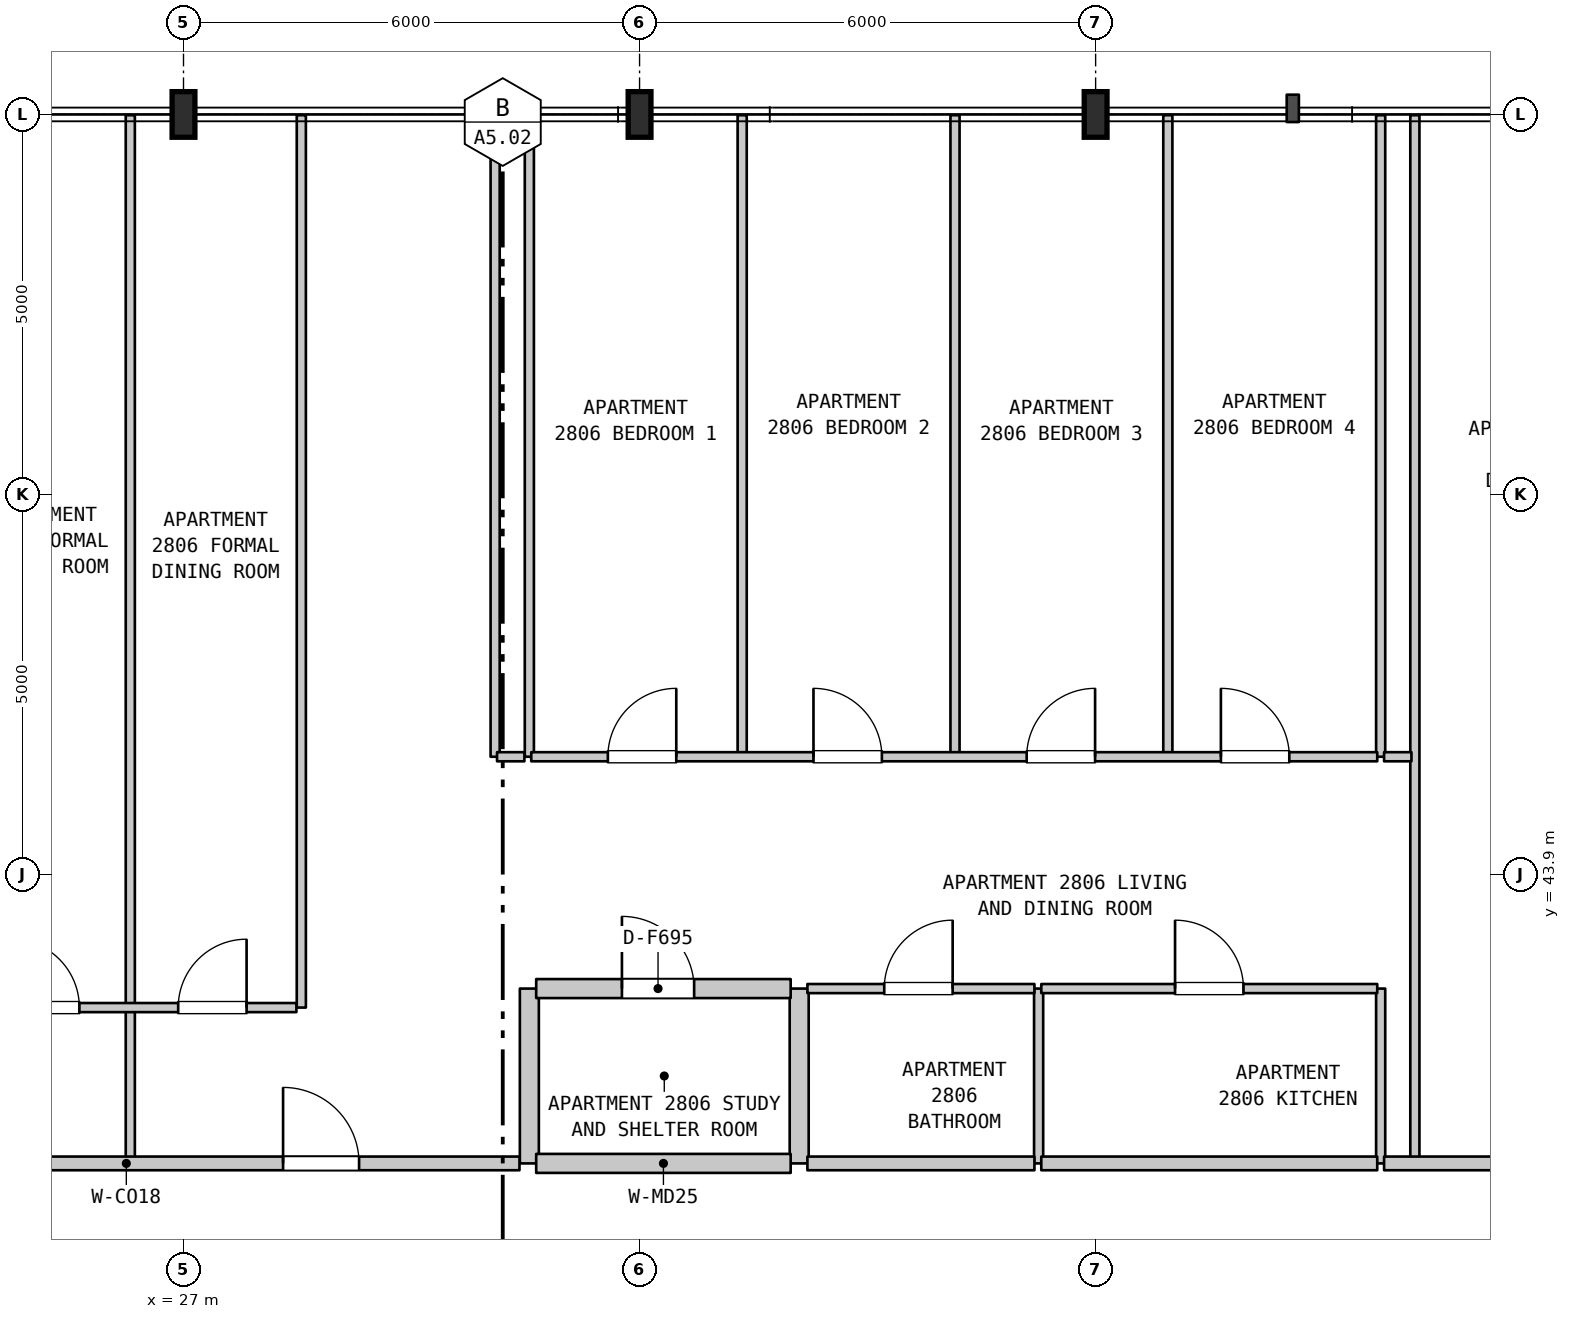
"""IFC4 building model, lengths in metres.
Left out: names, types, materials, properties, quantities, classifications, styles, units other than length and angle.
Written with IfcOpenShell. Run it as: python <this file> out.ifc"""

import sys

from ifc_helpers import new_model, si_unit, direction, frame, frame_2d, origin, origin_2d, place, context, subcontext, project, spatial, rectangle, i_section, extrude, element, fill, save


model = new_model("IFC4")
c1 = context("Model", 3, precision=1e-05, world=origin(), true_north=direction((0.0, 1.0)))
c2 = subcontext(c1, "Body", "Model", "MODEL_VIEW")
j1 = project(units=[si_unit("LENGTHUNIT", "METRE"), si_unit("PLANEANGLEUNIT", "RADIAN")], contexts=[c1])
p1 = place(None, origin())
s1 = spatial("IfcSite", under=j1, at=p1, CompositionType="ELEMENT")
p2 = place(p1, origin())
s2 = spatial("IfcBuilding", under=s1, at=p2, CompositionType="ELEMENT")
p3 = place(p2, frame((0.0, 0.0, 116.8)))
s3 = spatial("IfcBuildingStorey", under=s2, at=p3, CompositionType="ELEMENT", Elevation=116.8)
for number, where, z_axis, x_axis in (
    (1, (27.0, 53.9, 0.0), (0.0, 0.0, 1.0), (1.0, 0.0, 0.0)),
    (2, (33.0, 53.9, 0.0), (0.0, 0.0, 1.0), (1.0, 0.0, 0.0)),
    (3, (39.0, 53.9, 0.0), (0.0, 0.0, 1.0), (1.0, 0.0, 0.0)),
):
    element("IfcColumn", number, at=place(p3, frame(where, z_axis=z_axis, x_axis=x_axis)), inside=s3, PredefinedType="COLUMN", context=c2, shape_type="SweptSolid", body=[
        extrude(i_section(OverallWidth=0.3, OverallDepth=0.6, WebThickness=0.015, FlangeThickness=0.03, FilletRadius=0.027, at=origin_2d()), origin(), (0.0, 0.0, 1.0), 3.7),
    ])
p4 = place(p3, frame((26.3, 40.1, 0.0), z_axis=(0.0, 0.0, 1.0), x_axis=(0.0, 1.0, 0.0)))
e4 = element("IfcWall", 4, at=p4, inside=s3, PredefinedType="PARTITIONING", context=c2, shape_type="SweptSolid", body=[
    extrude(rectangle(XDim=2.05, YDim=0.12, at=frame_2d((1.025, 0.0))), origin(), (0.0, 0.0, 1.0), 3.38),
])
for number, where, z_axis, x_axis in (
    (5, (26.3, 42.15, 0.0), (0.0, 0.0, 1.0), (0.0, 1.0, 0.0)),
    (6, (28.55, 42.15, 0.0), (0.0, 0.0, 1.0), (0.0, 1.0, 0.0)),
):
    element("IfcWall", number, at=place(p3, frame(where, z_axis=z_axis, x_axis=x_axis)), inside=s3, PredefinedType="PARTITIONING", context=c2, shape_type="SweptSolid", body=[
        extrude(rectangle(XDim=11.74, YDim=0.12, at=frame_2d((5.87, 0.0))), origin(), (0.0, 0.0, 1.0), 3.38),
    ])
p5 = place(p3, frame((31.1, 45.45, 0.0), z_axis=(0.0, 0.0, 1.0), x_axis=(0.0, 1.0, 0.0)))
e7 = element("IfcWall", 7, at=p5, inside=s3, PredefinedType="PARTITIONING", context=c2, shape_type="SweptSolid", body=[
    extrude(rectangle(XDim=8.44, YDim=0.12, at=frame_2d((4.22, 0.0))), origin(), (0.0, 0.0, 1.0), 3.38),
])
p6 = place(p3, frame((31.55, 40.1, 0.0), z_axis=(0.0, 0.0, 1.0), x_axis=(0.0, 1.0, 0.0)))
e8 = element("IfcWall", 8, at=p6, inside=s3, PredefinedType="STANDARD", context=c2, shape_type="SweptSolid", body=[
    extrude(rectangle(XDim=2.3, YDim=0.25, at=frame_2d((1.15, 0.0))), origin(), (0.0, 0.0, 1.0), 3.38),
])
for number, where, z_axis, x_axis in (
    (9, (31.55, 45.45, 0.0), (0.0, 0.0, 1.0), (0.0, 1.0, 0.0)),
    (10, (34.35, 45.45, 0.0), (0.0, 0.0, 1.0), (0.0, 1.0, 0.0)),
):
    element("IfcWall", number, at=place(p3, frame(where, z_axis=z_axis, x_axis=x_axis)), inside=s3, PredefinedType="PARTITIONING", context=c2, shape_type="SweptSolid", body=[
        extrude(rectangle(XDim=8.44, YDim=0.12, at=frame_2d((4.22, 0.0))), origin(), (0.0, 0.0, 1.0), 3.38),
    ])
p7 = place(p3, frame((35.1, 40.1, 0.0), z_axis=(0.0, 0.0, 1.0), x_axis=(0.0, 1.0, 0.0)))
e11 = element("IfcWall", 11, at=p7, inside=s3, PredefinedType="STANDARD", context=c2, shape_type="SweptSolid", body=[
    extrude(rectangle(XDim=2.3, YDim=0.25, at=frame_2d((1.15, 0.0))), origin(), (0.0, 0.0, 1.0), 3.38),
])
p8 = place(p3, frame((37.15, 45.45, 0.0), z_axis=(0.0, 0.0, 1.0), x_axis=(0.0, 1.0, 0.0)))
e12 = element("IfcWall", 12, at=p8, inside=s3, PredefinedType="PARTITIONING", context=c2, shape_type="SweptSolid", body=[
    extrude(rectangle(XDim=8.44, YDim=0.12, at=frame_2d((4.22, 0.0))), origin(), (0.0, 0.0, 1.0), 3.38),
])
p9 = place(p3, frame((38.25, 40.1, 0.0), z_axis=(0.0, 0.0, 1.0), x_axis=(0.0, 1.0, 0.0)))
e13 = element("IfcWall", 13, at=p9, inside=s3, PredefinedType="PARTITIONING", context=c2, shape_type="SweptSolid", body=[
    extrude(rectangle(XDim=2.3, YDim=0.12, at=frame_2d((1.15, 0.0))), origin(), (0.0, 0.0, 1.0), 3.38),
])
p10 = place(p3, frame((39.95, 45.45, 0.0), z_axis=(0.0, 0.0, 1.0), x_axis=(0.0, 1.0, 0.0)))
e14 = element("IfcWall", 14, at=p10, inside=s3, PredefinedType="PARTITIONING", context=c2, shape_type="SweptSolid", body=[
    extrude(rectangle(XDim=8.44, YDim=0.12, at=frame_2d((4.22, 0.0))), origin(), (0.0, 0.0, 1.0), 3.38),
])
p11 = place(p3, frame((42.75, 40.1, 0.0), z_axis=(0.0, 0.0, 1.0), x_axis=(0.0, 1.0, 0.0)))
e15 = element("IfcWall", 15, at=p11, inside=s3, PredefinedType="PARTITIONING", context=c2, shape_type="SweptSolid", body=[
    extrude(rectangle(XDim=2.3, YDim=0.12, at=frame_2d((1.15, 0.0))), origin(), (0.0, 0.0, 1.0), 3.38),
])
p12 = place(p3, frame((42.75, 45.45, 0.0), z_axis=(0.0, 0.0, 1.0), x_axis=(0.0, 1.0, 0.0)))
e16 = element("IfcWall", 16, at=p12, inside=s3, PredefinedType="PARTITIONING", context=c2, shape_type="SweptSolid", body=[
    extrude(rectangle(XDim=8.44, YDim=0.12, at=frame_2d((4.22, 0.0))), origin(), (0.0, 0.0, 1.0), 3.38),
])
p13 = place(p3, frame((43.2, 40.1, 0.0), z_axis=(0.0, 0.0, 1.0), x_axis=(0.0, 1.0, 0.0)))
e17 = element("IfcWall", 17, at=p13, inside=s3, PredefinedType="PARTITIONING", context=c2, shape_type="SweptSolid", body=[
    extrude(rectangle(XDim=13.79, YDim=0.12, at=frame_2d((6.895, 0.0))), origin(), (0.0, 0.0, 1.0), 3.38),
])
p14 = place(p3, frame((21.075, 40.1, 0.0), z_axis=(0.0, 0.0, 1.0), x_axis=(1.0, 0.0, 0.0)))
e18 = element("IfcWall", 18, at=p14, inside=s3, PredefinedType="STANDARD", context=c2, shape_type="SweptSolid", body=[
    extrude(rectangle(XDim=10.345, YDim=0.18, at=frame_2d((5.172, 0.0))), origin(), (0.0, 0.0, 1.0), 3.38),
])
p15 = place(p14, frame((2.305, 0.0, 0.0)))
e19 = element("IfcOpeningElement", 19, at=p15, cuts=e18, PredefinedType="OPENING", context=c2, shape_type="SweptSolid", body=[
    extrude(rectangle(XDim=1.0, YDim=2.15, at=frame_2d((0.5, 1.075))), frame((0.0, 0.1, 0.0), z_axis=(0.0, -1.0, 0.0), x_axis=(1.0, 0.0, 0.0)), (0.0, 0.0, 1.0), 0.2),
])
p16 = place(p14, frame((7.235, 0.0, 0.0)))
e20 = element("IfcOpeningElement", 20, at=p16, cuts=e18, PredefinedType="OPENING", context=c2, shape_type="SweptSolid", body=[
    extrude(rectangle(XDim=1.0, YDim=2.15, at=frame_2d((0.5, 1.075))), frame((0.0, 0.1, 0.0), z_axis=(0.0, -1.0, 0.0), x_axis=(1.0, 0.0, 0.0)), (0.0, 0.0, 1.0), 0.2),
])
p17 = place(p3, frame((31.64, 40.1, 0.0), z_axis=(0.0, 0.0, 1.0), x_axis=(1.0, 0.0, 0.0)))
e21 = element("IfcWall", 21, at=p17, inside=s3, PredefinedType="STANDARD", context=c2, shape_type="SweptSolid", body=[
    extrude(rectangle(XDim=3.348, YDim=0.25, at=frame_2d((1.674, 0.0))), origin(), (0.0, 0.0, 1.0), 3.38),
])
p18 = place(p3, frame((35.208, 40.1, 0.0), z_axis=(0.0, 0.0, 1.0), x_axis=(1.0, 0.0, 0.0)))
e22 = element("IfcWall", 22, at=p18, inside=s3, PredefinedType="STANDARD", context=c2, shape_type="SweptSolid", body=[
    extrude(rectangle(XDim=2.987, YDim=0.18, at=frame_2d((1.494, 0.0))), origin(), (0.0, 0.0, 1.0), 3.38),
])
p19 = place(p3, frame((38.285, 40.1, 0.0), z_axis=(0.0, 0.0, 1.0), x_axis=(1.0, 0.0, 0.0)))
e23 = element("IfcWall", 23, at=p19, inside=s3, PredefinedType="STANDARD", context=c2, shape_type="SweptSolid", body=[
    extrude(rectangle(XDim=4.42, YDim=0.18, at=frame_2d((2.21, 0.0))), origin(), (0.0, 0.0, 1.0), 3.38),
])
p20 = place(p3, frame((42.795, 40.1, 0.0), z_axis=(0.0, 0.0, 1.0), x_axis=(1.0, 0.0, 0.0)))
e24 = element("IfcWall", 24, at=p20, inside=s3, PredefinedType="STANDARD", context=c2, shape_type="SweptSolid", body=[
    extrude(rectangle(XDim=3.96, YDim=0.18, at=frame_2d((1.98, 0.0))), origin(), (0.0, 0.0, 1.0), 3.38),
])
p21 = place(p20, frame((1.609, 0.0, 0.0)))
e25 = element("IfcOpeningElement", 25, at=p21, cuts=e24, PredefinedType="OPENING", context=c2, shape_type="SweptSolid", body=[
    extrude(rectangle(XDim=1.0, YDim=2.15, at=frame_2d((0.5, 1.075))), frame((0.0, 0.1, 0.0), z_axis=(0.0, -1.0, 0.0), x_axis=(1.0, 0.0, 0.0)), (0.0, 0.0, 1.0), 0.2),
])
p22 = place(p3, frame((24.075, 42.15, 0.0), z_axis=(0.0, 0.0, 1.0), x_axis=(1.0, 0.0, 0.0)))
e26 = element("IfcWall", 26, at=p22, inside=s3, PredefinedType="PARTITIONING", context=c2, shape_type="SweptSolid", body=[
    extrude(rectangle(XDim=4.41, YDim=0.12, at=frame_2d((2.205, 0.0))), origin(), (0.0, 0.0, 1.0), 3.38),
])
p23 = place(p22, frame((0.655, 0.0, 0.0)))
e27 = element("IfcOpeningElement", 27, at=p23, cuts=e26, PredefinedType="OPENING", context=c2, shape_type="SweptSolid", body=[
    extrude(rectangle(XDim=0.9, YDim=2.15, at=frame_2d((0.45, 1.075))), frame((0.0, 0.07, 0.0), z_axis=(0.0, -1.0, 0.0), x_axis=(1.0, 0.0, 0.0)), (0.0, 0.0, 1.0), 0.14),
])
p24 = place(p22, frame((2.855, 0.0, 0.0)))
e28 = element("IfcOpeningElement", 28, at=p24, cuts=e26, PredefinedType="OPENING", context=c2, shape_type="SweptSolid", body=[
    extrude(rectangle(XDim=0.9, YDim=2.15, at=frame_2d((0.45, 1.075))), frame((0.0, 0.07, 0.0), z_axis=(0.0, -1.0, 0.0), x_axis=(1.0, 0.0, 0.0)), (0.0, 0.0, 1.0), 0.14),
])
p25 = place(p3, frame((31.64, 42.4, 0.0), z_axis=(0.0, 0.0, 1.0), x_axis=(1.0, 0.0, 0.0)))
e29 = element("IfcWall", 29, at=p25, inside=s3, PredefinedType="STANDARD", context=c2, shape_type="SweptSolid", body=[
    extrude(rectangle(XDim=3.348, YDim=0.25, at=frame_2d((1.674, 0.0))), origin(), (0.0, 0.0, 1.0), 3.38),
])
p26 = place(p25, frame((1.128, 0.0, 0.0)))
e30 = element("IfcOpeningElement", 30, at=p26, cuts=e29, PredefinedType="OPENING", context=c2, shape_type="SweptSolid", body=[
    extrude(rectangle(XDim=0.95, YDim=2.15, at=frame_2d((0.475, 1.075))), frame((0.0, 0.135, 0.0), z_axis=(0.0, -1.0, 0.0), x_axis=(1.0, 0.0, 0.0)), (0.0, 0.0, 1.0), 0.27),
])
p27 = place(p3, frame((35.208, 42.4, 0.0), z_axis=(0.0, 0.0, 1.0), x_axis=(1.0, 0.0, 0.0)))
e31 = element("IfcWall", 31, at=p27, inside=s3, PredefinedType="PARTITIONING", context=c2, shape_type="SweptSolid", body=[
    extrude(rectangle(XDim=2.987, YDim=0.12, at=frame_2d((1.494, 0.0))), origin(), (0.0, 0.0, 1.0), 3.38),
])
p28 = place(p27, frame((1.011, 0.0, 0.0)))
e32 = element("IfcOpeningElement", 32, at=p28, cuts=e31, PredefinedType="OPENING", context=c2, shape_type="SweptSolid", body=[
    extrude(rectangle(XDim=0.9, YDim=2.1, at=frame_2d((0.45, 1.05))), frame((0.0, 0.07, 0.0), z_axis=(0.0, -1.0, 0.0), x_axis=(1.0, 0.0, 0.0)), (0.0, 0.0, 1.0), 0.14),
])
p29 = place(p3, frame((38.285, 42.4, 0.0), z_axis=(0.0, 0.0, 1.0), x_axis=(1.0, 0.0, 0.0)))
e33 = element("IfcWall", 33, at=p29, inside=s3, PredefinedType="PARTITIONING", context=c2, shape_type="SweptSolid", body=[
    extrude(rectangle(XDim=4.42, YDim=0.12, at=frame_2d((2.21, 0.0))), origin(), (0.0, 0.0, 1.0), 3.38),
])
p30 = place(p29, frame((1.76, 0.0, 0.0)))
e34 = element("IfcOpeningElement", 34, at=p30, cuts=e33, PredefinedType="OPENING", context=c2, shape_type="SweptSolid", body=[
    extrude(rectangle(XDim=0.9, YDim=2.15, at=frame_2d((0.45, 1.075))), frame((0.0, 0.07, 0.0), z_axis=(0.0, -1.0, 0.0), x_axis=(1.0, 0.0, 0.0)), (0.0, 0.0, 1.0), 0.14),
])
p31 = place(p3, frame((31.125, 45.45, 0.0), z_axis=(0.0, 0.0, 1.0), x_axis=(1.0, 0.0, 0.0)))
e35 = element("IfcWall", 35, at=p31, inside=s3, PredefinedType="PARTITIONING", context=c2, shape_type="SweptSolid", body=[
    extrude(rectangle(XDim=0.36, YDim=0.12, at=frame_2d((0.18, 0.0))), origin(), (0.0, 0.0, 1.0), 3.38),
])
p32 = place(p3, frame((31.575, 45.45, 0.0), z_axis=(0.0, 0.0, 1.0), x_axis=(1.0, 0.0, 0.0)))
e36 = element("IfcWall", 36, at=p32, inside=s3, PredefinedType="PARTITIONING", context=c2, shape_type="SweptSolid", body=[
    extrude(rectangle(XDim=11.13, YDim=0.12, at=frame_2d((5.565, 0.0))), origin(), (0.0, 0.0, 1.0), 3.38),
])
p33 = place(p32, frame((1.008, 0.0, 0.0)))
e37 = element("IfcOpeningElement", 37, at=p33, cuts=e36, PredefinedType="OPENING", context=c2, shape_type="SweptSolid", body=[
    extrude(rectangle(XDim=0.9, YDim=2.15, at=frame_2d((0.45, 1.075))), frame((0.0, 0.07, 0.0), z_axis=(0.0, -1.0, 0.0), x_axis=(1.0, 0.0, 0.0)), (0.0, 0.0, 1.0), 0.14),
])
p34 = place(p32, frame((3.713, 0.0, 0.0)))
e38 = element("IfcOpeningElement", 38, at=p34, cuts=e36, PredefinedType="OPENING", context=c2, shape_type="SweptSolid", body=[
    extrude(rectangle(XDim=0.9, YDim=2.15, at=frame_2d((0.45, 1.075))), frame((0.0, 0.07, 0.0), z_axis=(0.0, -1.0, 0.0), x_axis=(1.0, 0.0, 0.0)), (0.0, 0.0, 1.0), 0.14),
])
p35 = place(p32, frame((6.518, 0.0, 0.0)))
e39 = element("IfcOpeningElement", 39, at=p35, cuts=e36, PredefinedType="OPENING", context=c2, shape_type="SweptSolid", body=[
    extrude(rectangle(XDim=0.9, YDim=2.15, at=frame_2d((0.45, 1.075))), frame((0.0, 0.07, 0.0), z_axis=(0.0, -1.0, 0.0), x_axis=(1.0, 0.0, 0.0)), (0.0, 0.0, 1.0), 0.14),
])
p36 = place(p32, frame((9.073, 0.0, 0.0)))
e40 = element("IfcOpeningElement", 40, at=p36, cuts=e36, PredefinedType="OPENING", context=c2, shape_type="SweptSolid", body=[
    extrude(rectangle(XDim=0.9, YDim=2.15, at=frame_2d((0.45, 1.075))), frame((0.0, 0.07, 0.0), z_axis=(0.0, -1.0, 0.0), x_axis=(1.0, 0.0, 0.0)), (0.0, 0.0, 1.0), 0.14),
])
p37 = place(p3, frame((42.795, 45.45, 0.0), z_axis=(0.0, 0.0, 1.0), x_axis=(1.0, 0.0, 0.0)))
e41 = element("IfcWall", 41, at=p37, inside=s3, PredefinedType="PARTITIONING", context=c2, shape_type="SweptSolid", body=[
    extrude(rectangle(XDim=0.36, YDim=0.12, at=frame_2d((0.18, 0.0))), origin(), (0.0, 0.0, 1.0), 3.38),
])
p38 = place(p16, origin())
e42 = element("IfcDoor", 42, at=p38, inside=s3, OperationType="SINGLE_SWING_LEFT", PredefinedType="DOOR", context=c2, shape_type="SweptSolid", body=[
    extrude(rectangle(XDim=1.0, YDim=2.15, at=frame_2d((0.5, 1.075))), frame((0.0, 0.025, 0.0), z_axis=(0.0, -1.0, 0.0), x_axis=(1.0, 0.0, 0.0)), (0.0, 0.0, 1.0), 0.05),
])
fill(e20, e42)
p39 = place(p23, origin())
e43 = element("IfcDoor", 43, at=p39, inside=s3, OperationType="SINGLE_SWING_LEFT", PredefinedType="DOOR", context=c2, shape_type="SweptSolid", body=[
    extrude(rectangle(XDim=0.9, YDim=2.15, at=frame_2d((0.45, 1.075))), frame((0.0, 0.025, 0.0), z_axis=(0.0, -1.0, 0.0), x_axis=(1.0, 0.0, 0.0)), (0.0, 0.0, 1.0), 0.05),
])
fill(e27, e43)
p40 = place(p24, origin())
e44 = element("IfcDoor", 44, at=p40, inside=s3, OperationType="SINGLE_SWING_RIGHT", PredefinedType="DOOR", context=c2, shape_type="SweptSolid", body=[
    extrude(rectangle(XDim=0.9, YDim=2.15, at=frame_2d((0.45, 1.075))), frame((0.0, 0.025, 0.0), z_axis=(0.0, -1.0, 0.0), x_axis=(1.0, 0.0, 0.0)), (0.0, 0.0, 1.0), 0.05),
])
fill(e28, e44)
p41 = place(p26, origin())
e45 = element("IfcDoor", 45, at=p41, inside=s3, OperationType="SINGLE_SWING_LEFT", PredefinedType="DOOR", context=c2, shape_type="SweptSolid", body=[
    extrude(rectangle(XDim=0.95, YDim=2.15, at=frame_2d((0.475, 1.075))), frame((0.0, 0.025, 0.0), z_axis=(0.0, -1.0, 0.0), x_axis=(1.0, 0.0, 0.0)), (0.0, 0.0, 1.0), 0.05),
])
fill(e30, e45)
p42 = place(p28, origin())
e46 = element("IfcDoor", 46, at=p42, inside=s3, OperationType="SINGLE_SWING_RIGHT", PredefinedType="DOOR", context=c2, shape_type="SweptSolid", body=[
    extrude(rectangle(XDim=0.9, YDim=2.1, at=frame_2d((0.45, 1.05))), frame((0.0, 0.025, 0.0), z_axis=(0.0, -1.0, 0.0), x_axis=(1.0, 0.0, 0.0)), (0.0, 0.0, 1.0), 0.05),
])
fill(e32, e46)
p43 = place(p30, origin())
e47 = element("IfcDoor", 47, at=p43, inside=s3, OperationType="SINGLE_SWING_LEFT", PredefinedType="DOOR", context=c2, shape_type="SweptSolid", body=[
    extrude(rectangle(XDim=0.9, YDim=2.15, at=frame_2d((0.45, 1.075))), frame((0.0, 0.025, 0.0), z_axis=(0.0, -1.0, 0.0), x_axis=(1.0, 0.0, 0.0)), (0.0, 0.0, 1.0), 0.05),
])
fill(e34, e47)
p44 = place(p33, origin())
e48 = element("IfcDoor", 48, at=p44, inside=s3, OperationType="SINGLE_SWING_RIGHT", PredefinedType="DOOR", context=c2, shape_type="SweptSolid", body=[
    extrude(rectangle(XDim=0.9, YDim=2.15, at=frame_2d((0.45, 1.075))), frame((0.0, 0.025, 0.0), z_axis=(0.0, -1.0, 0.0), x_axis=(1.0, 0.0, 0.0)), (0.0, 0.0, 1.0), 0.05),
])
fill(e37, e48)
p45 = place(p34, origin())
e49 = element("IfcDoor", 49, at=p45, inside=s3, OperationType="SINGLE_SWING_LEFT", PredefinedType="DOOR", context=c2, shape_type="SweptSolid", body=[
    extrude(rectangle(XDim=0.9, YDim=2.15, at=frame_2d((0.45, 1.075))), frame((0.0, 0.025, 0.0), z_axis=(0.0, -1.0, 0.0), x_axis=(1.0, 0.0, 0.0)), (0.0, 0.0, 1.0), 0.05),
])
fill(e38, e49)
p46 = place(p35, origin())
e50 = element("IfcDoor", 50, at=p46, inside=s3, OperationType="SINGLE_SWING_RIGHT", PredefinedType="DOOR", context=c2, shape_type="SweptSolid", body=[
    extrude(rectangle(XDim=0.9, YDim=2.15, at=frame_2d((0.45, 1.075))), frame((0.0, 0.025, 0.0), z_axis=(0.0, -1.0, 0.0), x_axis=(1.0, 0.0, 0.0)), (0.0, 0.0, 1.0), 0.05),
])
fill(e39, e50)
p47 = place(p36, origin())
e51 = element("IfcDoor", 51, at=p47, inside=s3, OperationType="SINGLE_SWING_LEFT", PredefinedType="DOOR", context=c2, shape_type="SweptSolid", body=[
    extrude(rectangle(XDim=0.9, YDim=2.15, at=frame_2d((0.45, 1.075))), frame((0.0, 0.025, 0.0), z_axis=(0.0, -1.0, 0.0), x_axis=(1.0, 0.0, 0.0)), (0.0, 0.0, 1.0), 0.05),
])
fill(e40, e51)
save(model, sys.argv[1])
